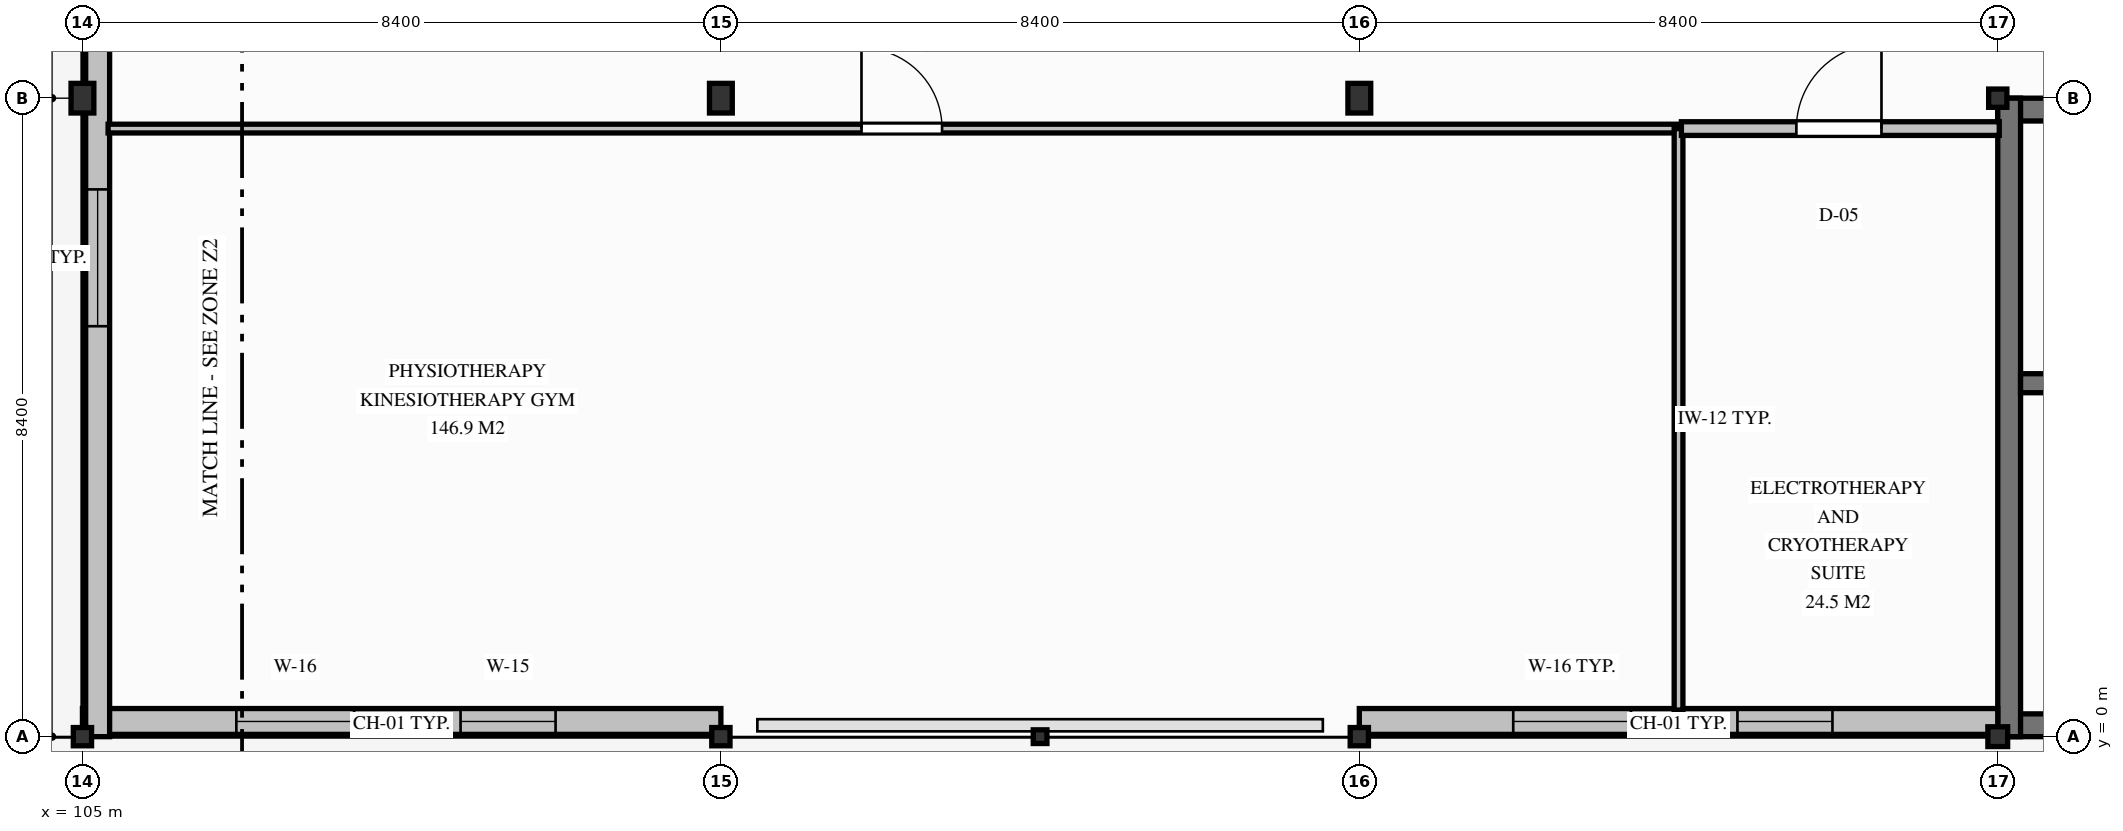
"""IFC4 building model, lengths in metres.
Left out: names, types, materials, properties, quantities, classifications, styles, units other than length and angle.
Written with IfcOpenShell. Run it as: python <this file> out.ifc"""

import sys

from ifc_helpers import new_model, si_unit, direction, frame, frame_2d, origin, origin_2d, place, context, subcontext, project, spatial, rectangle, hollow_rectangle, i_section, extrude, element, fill, save


model = new_model("IFC4")
c1 = context("Model", 3, precision=1e-05, world=origin(), true_north=direction((0.0, 1.0)))
c2 = subcontext(c1, "Body", "Model", "MODEL_VIEW")
j1 = project(units=[si_unit("LENGTHUNIT", "METRE"), si_unit("PLANEANGLEUNIT", "RADIAN")], contexts=[c1])
p1 = place(None, origin())
s1 = spatial("IfcSite", under=j1, at=p1, CompositionType="ELEMENT")
p2 = place(p1, origin())
s2 = spatial("IfcBuilding", under=s1, at=p2, CompositionType="ELEMENT")
p3 = place(p2, origin())
s3 = spatial("IfcBuildingStorey", under=s2, at=p3, CompositionType="ELEMENT", Elevation=0.0)
p4 = place(p3, frame((130.2, 8.25, 0.0), z_axis=(0.0, 0.0, 1.0), x_axis=(1.0, 0.0, 0.0)))
e1 = element("IfcWall", 1, at=p4, inside=s3, PredefinedType="SHEAR", context=c2, shape_type="SweptSolid", body=[
    extrude(rectangle(XDim=8.4, YDim=0.3, at=frame_2d((4.2, 0.0))), origin(), (0.0, 0.0, 1.0), 4.5),
])
p5 = place(p4, frame((0.8, 0.0, 0.0)))
e2 = element("IfcOpeningElement", 2, at=p5, cuts=e1, PredefinedType="OPENING", context=c2, shape_type="SweptSolid", body=[
    extrude(rectangle(XDim=1.1, YDim=2.15, at=frame_2d((0.55, 1.075))), frame((0.0, 0.16, 0.0), z_axis=(0.0, -1.0, 0.0), x_axis=(1.0, 0.0, 0.0)), (0.0, 0.0, 1.0), 0.32),
])
p6 = place(p3, frame((138.6, 0.15, 0.0), z_axis=(0.0, 0.0, 1.0), x_axis=(-1.0, 0.0, 0.0)))
e3 = element("IfcWall", 3, at=p6, inside=s3, PredefinedType="SHEAR", context=c2, shape_type="SweptSolid", body=[
    extrude(rectangle(XDim=8.4, YDim=0.3, at=frame_2d((4.2, 0.0))), origin(), (0.0, 0.0, 1.0), 4.5),
])
p7 = place(p6, frame((6.4, 0.0, 0.0)))
e4 = element("IfcOpeningElement", 4, at=p7, cuts=e3, PredefinedType="OPENING", context=c2, shape_type="SweptSolid", body=[
    extrude(rectangle(XDim=1.3, YDim=2.25, at=frame_2d((0.65, 1.125))), frame((0.0, 0.16, 0.0), z_axis=(0.0, -1.0, 0.0), x_axis=(1.0, 0.0, 0.0)), (0.0, 0.0, 1.0), 0.32),
])
p8 = place(p3, frame((130.35, 0.0, 0.0), z_axis=(0.0, 0.0, 1.0), x_axis=(0.0, 1.0, 0.0)))
e5 = element("IfcWall", 5, at=p8, inside=s3, PredefinedType="SHEAR", context=c2, shape_type="SweptSolid", body=[
    extrude(rectangle(XDim=8.4, YDim=0.3, at=frame_2d((4.2, 0.0))), origin(), (0.0, 0.0, 1.0), 4.5),
])
p9 = place(p3, frame((130.5, 4.65, 0.0), z_axis=(0.0, 0.0, 1.0), x_axis=(1.0, 0.0, 0.0)))
e6 = element("IfcWall", 6, at=p9, inside=s3, PredefinedType="SHEAR", context=c2, shape_type="SweptSolid", body=[
    extrude(rectangle(XDim=7.8, YDim=0.25, at=frame_2d((3.9, 0.0))), origin(), (0.0, 0.0, 1.0), 4.5),
])
p10 = place(p3, frame((105.0, 0.0, 0.0), z_axis=(0.0, 0.0, 1.0), x_axis=(1.0, 0.0, 0.0)))
e7 = element("IfcColumn", 7, at=p10, inside=s3, PredefinedType="COLUMN", context=c2, shape_type="SweptSolid", body=[
    extrude(i_section(OverallWidth=0.24, OverallDepth=0.24, WebThickness=0.01, FlangeThickness=0.017, FilletRadius=0.021, at=origin_2d()), origin(), (0.0, 0.0, 1.0), 4.5),
])
p11 = place(p3, frame((105.0, 8.4, 0.0), z_axis=(0.0, 0.0, 1.0), x_axis=(1.0, 0.0, 0.0)))
e8 = element("IfcColumn", 8, at=p11, inside=s3, PredefinedType="COLUMN", context=c2, shape_type="SweptSolid", body=[
    extrude(i_section(OverallWidth=0.3, OverallDepth=0.39, WebThickness=0.011, FlangeThickness=0.019, FilletRadius=0.027, at=origin_2d()), origin(), (0.0, 0.0, 1.0), 4.5),
])
p12 = place(p3, frame((113.4, 0.0, 0.0), z_axis=(0.0, 0.0, 1.0), x_axis=(1.0, 0.0, 0.0)))
e9 = element("IfcColumn", 9, at=p12, inside=s3, PredefinedType="COLUMN", context=c2, shape_type="SweptSolid", body=[
    extrude(i_section(OverallWidth=0.24, OverallDepth=0.24, WebThickness=0.01, FlangeThickness=0.017, FilletRadius=0.021, at=origin_2d()), origin(), (0.0, 0.0, 1.0), 4.5),
])
p13 = place(p3, frame((113.4, 8.4, 0.0), z_axis=(0.0, 0.0, 1.0), x_axis=(1.0, 0.0, 0.0)))
e10 = element("IfcColumn", 10, at=p13, inside=s3, PredefinedType="COLUMN", context=c2, shape_type="SweptSolid", body=[
    extrude(i_section(OverallWidth=0.3, OverallDepth=0.39, WebThickness=0.011, FlangeThickness=0.019, FilletRadius=0.027, at=origin_2d()), origin(), (0.0, 0.0, 1.0), 4.5),
])
p14 = place(p3, frame((121.8, 0.0, 0.0), z_axis=(0.0, 0.0, 1.0), x_axis=(1.0, 0.0, 0.0)))
e11 = element("IfcColumn", 11, at=p14, inside=s3, PredefinedType="COLUMN", context=c2, shape_type="SweptSolid", body=[
    extrude(i_section(OverallWidth=0.24, OverallDepth=0.24, WebThickness=0.01, FlangeThickness=0.017, FilletRadius=0.021, at=origin_2d()), origin(), (0.0, 0.0, 1.0), 4.5),
])
p15 = place(p3, frame((121.8, 8.4, 0.0), z_axis=(0.0, 0.0, 1.0), x_axis=(1.0, 0.0, 0.0)))
e12 = element("IfcColumn", 12, at=p15, inside=s3, PredefinedType="COLUMN", context=c2, shape_type="SweptSolid", body=[
    extrude(i_section(OverallWidth=0.3, OverallDepth=0.39, WebThickness=0.011, FlangeThickness=0.019, FilletRadius=0.027, at=origin_2d()), origin(), (0.0, 0.0, 1.0), 4.5),
])
p16 = place(p3, frame((130.2, 0.0, 0.0), z_axis=(0.0, 0.0, 1.0), x_axis=(1.0, 0.0, 0.0)))
e13 = element("IfcColumn", 13, at=p16, inside=s3, PredefinedType="COLUMN", context=c2, shape_type="SweptSolid", body=[
    extrude(i_section(OverallWidth=0.26, OverallDepth=0.26, WebThickness=0.01, FlangeThickness=0.018, FilletRadius=0.024, at=origin_2d()), origin(), (0.0, 0.0, 1.0), 4.5),
])
p17 = place(p3, frame((130.2, 8.4, 0.0), z_axis=(0.0, 0.0, 1.0), x_axis=(1.0, 0.0, 0.0)))
e14 = element("IfcColumn", 14, at=p17, inside=s3, PredefinedType="COLUMN", context=c2, shape_type="SweptSolid", body=[
    extrude(i_section(OverallWidth=0.24, OverallDepth=0.24, WebThickness=0.01, FlangeThickness=0.017, FilletRadius=0.021, at=origin_2d()), origin(), (0.0, 0.0, 1.0), 4.5),
])
p18 = place(p3, frame((117.6, 0.0, 0.0), z_axis=(0.0, 0.0, 1.0), x_axis=(1.0, 0.0, 0.0)))
e15 = element("IfcColumn", 15, at=p18, inside=s3, PredefinedType="PILASTER", context=c2, shape_type="SweptSolid", body=[
    extrude(hollow_rectangle(XDim=0.18, YDim=0.18, WallThickness=0.01, InnerFilletRadius=0.015, OuterFilletRadius=0.025, at=origin_2d()), origin(), (0.0, 0.0, 1.0), 4.5),
])
p19 = place(p3, frame((130.2, 0.2, 0.0), z_axis=(0.0, 0.0, 1.0), x_axis=(-1.0, 0.0, 0.0)))
e16 = element("IfcWall", 16, at=p19, inside=s3, PredefinedType="SOLIDWALL", context=c2, shape_type="SweptSolid", body=[
    extrude(rectangle(XDim=8.4, YDim=0.34, at=frame_2d((4.2, 0.0))), origin(), (0.0, 0.0, 1.0), 3.678),
])
p20 = place(p19, frame((2.175, 0.0, 0.85)))
e17 = element("IfcOpeningElement", 17, at=p20, cuts=e16, PredefinedType="OPENING", context=c2, shape_type="SweptSolid", body=[
    extrude(rectangle(XDim=1.25, YDim=1.5, at=frame_2d((0.625, 0.75))), frame((0.0, 0.18, 0.0), z_axis=(0.0, -1.0, 0.0), x_axis=(1.0, 0.0, 0.0)), (0.0, 0.0, 1.0), 0.36),
])
p21 = place(p19, frame((4.825, 0.0, 0.85)))
e18 = element("IfcOpeningElement", 18, at=p21, cuts=e16, PredefinedType="OPENING", context=c2, shape_type="SweptSolid", body=[
    extrude(rectangle(XDim=1.55, YDim=1.6, at=frame_2d((0.775, 0.8))), frame((0.0, 0.18, 0.0), z_axis=(0.0, -1.0, 0.0), x_axis=(1.0, 0.0, 0.0)), (0.0, 0.0, 1.0), 0.36),
])
p22 = place(p3, frame((113.4, 0.2, 0.0), z_axis=(0.0, 0.0, 1.0), x_axis=(-1.0, 0.0, 0.0)))
e19 = element("IfcWall", 19, at=p22, inside=s3, PredefinedType="SOLIDWALL", context=c2, shape_type="SweptSolid", body=[
    extrude(rectangle(XDim=8.4, YDim=0.34, at=frame_2d((4.2, 0.0))), origin(), (0.0, 0.0, 1.0), 3.778),
])
p23 = place(p22, frame((2.175, 0.0, 0.85)))
e20 = element("IfcOpeningElement", 20, at=p23, cuts=e19, PredefinedType="OPENING", context=c2, shape_type="SweptSolid", body=[
    extrude(rectangle(XDim=1.25, YDim=1.5, at=frame_2d((0.625, 0.75))), frame((0.0, 0.18, 0.0), z_axis=(0.0, -1.0, 0.0), x_axis=(1.0, 0.0, 0.0)), (0.0, 0.0, 1.0), 0.36),
])
p24 = place(p22, frame((4.825, 0.0, 0.85)))
e21 = element("IfcOpeningElement", 21, at=p24, cuts=e19, PredefinedType="OPENING", context=c2, shape_type="SweptSolid", body=[
    extrude(rectangle(XDim=1.55, YDim=1.6, at=frame_2d((0.775, 0.8))), frame((0.0, 0.18, 0.0), z_axis=(0.0, -1.0, 0.0), x_axis=(1.0, 0.0, 0.0)), (0.0, 0.0, 1.0), 0.36),
])
p25 = place(p3, frame((105.2, 0.0, 0.0), z_axis=(0.0, 0.0, 1.0), x_axis=(0.0, 1.0, 0.0)))
e22 = element("IfcWall", 22, at=p25, inside=s3, PredefinedType="SOLIDWALL", context=c2, shape_type="SweptSolid", body=[
    extrude(rectangle(XDim=25.2, YDim=0.315, at=frame_2d((12.6, 0.0))), origin(), (0.0, 0.0, 1.0), 3.778),
])
p26 = place(p25, frame((5.4, 0.0, 0.85)))
e23 = element("IfcOpeningElement", 23, at=p26, cuts=e22, PredefinedType="OPENING", context=c2, shape_type="SweptSolid", body=[
    extrude(rectangle(XDim=1.8, YDim=1.95, at=frame_2d((0.9, 0.975))), frame((0.0, 0.167, 0.0), z_axis=(0.0, -1.0, 0.0), x_axis=(1.0, 0.0, 0.0)), (0.0, 0.0, 1.0), 0.335),
])
p27 = place(p25, frame((11.6, 0.0, 0.85)))
e24 = element("IfcOpeningElement", 24, at=p27, cuts=e22, PredefinedType="OPENING", context=c2, shape_type="SweptSolid", body=[
    extrude(rectangle(XDim=2.0, YDim=1.95, at=frame_2d((1.0, 0.975))), frame((0.0, 0.167, 0.0), z_axis=(0.0, -1.0, 0.0), x_axis=(1.0, 0.0, 0.0)), (0.0, 0.0, 1.0), 0.335),
])
p28 = place(p25, frame((17.85, 0.0, 0.85)))
e25 = element("IfcOpeningElement", 25, at=p28, cuts=e22, PredefinedType="OPENING", context=c2, shape_type="SweptSolid", body=[
    extrude(rectangle(XDim=2.1, YDim=2.0, at=frame_2d((1.05, 1.0))), frame((0.0, 0.167, 0.0), z_axis=(0.0, -1.0, 0.0), x_axis=(1.0, 0.0, 0.0)), (0.0, 0.0, 1.0), 0.335),
])
p29 = place(p3, frame((105.337, 8.0, 0.0), z_axis=(0.0, 0.0, 1.0), x_axis=(1.0, 0.0, 0.0)))
e26 = element("IfcWall", 26, at=p29, inside=s3, PredefinedType="PARTITIONING", context=c2, shape_type="SweptSolid", body=[
    extrude(rectangle(XDim=20.663, YDim=0.115, at=frame_2d((10.331, 0.0))), origin(), (0.0, 0.0, 1.0), 3.778),
])
p30 = place(p29, frame((9.913, 0.0, 0.0)))
e27 = element("IfcOpeningElement", 27, at=p30, cuts=e26, PredefinedType="OPENING", context=c2, shape_type="SweptSolid", body=[
    extrude(rectangle(XDim=1.06, YDim=2.16, at=frame_2d((0.53, 1.08))), frame((0.0, 0.067, 0.0), z_axis=(0.0, -1.0, 0.0), x_axis=(1.0, 0.0, 0.0)), (0.0, 0.0, 1.0), 0.135),
])
p31 = place(p3, frame((126.0, 8.0, 0.0), z_axis=(0.0, 0.0, 1.0), x_axis=(0.0, -1.0, 0.0)))
e28 = element("IfcWall", 28, at=p31, inside=s3, PredefinedType="PARTITIONING", context=c2, shape_type="SweptSolid", body=[
    extrude(rectangle(XDim=7.65, YDim=0.115, at=frame_2d((3.825, 0.0))), origin(), (0.0, 0.0, 1.0), 3.928),
])
p32 = place(p3, frame((126.038, 8.0, 0.0), z_axis=(0.0, 0.0, 1.0), x_axis=(1.0, 0.0, 0.0)))
e29 = element("IfcWall", 29, at=p32, inside=s3, PredefinedType="PARTITIONING", context=c2, shape_type="SweptSolid", body=[
    extrude(rectangle(XDim=4.182, YDim=0.18, at=frame_2d((2.091, 0.0))), origin(), (0.0, 0.0, 1.0), 3.678),
])
p33 = place(p32, frame((1.512, 0.0, 0.0)))
e30 = element("IfcOpeningElement", 30, at=p33, cuts=e29, PredefinedType="OPENING", context=c2, shape_type="SweptSolid", body=[
    extrude(rectangle(XDim=1.12, YDim=2.18, at=frame_2d((0.56, 1.09))), frame((0.0, 0.1, 0.0), z_axis=(0.0, -1.0, 0.0), x_axis=(1.0, 0.0, 0.0)), (0.0, 0.0, 1.0), 0.2),
])
p34 = place(p20, origin())
e31 = element("IfcWindow", 31, at=p34, inside=s3, PartitioningType="SINGLE_PANEL", PredefinedType="WINDOW", context=c2, shape_type="SweptSolid", body=[
    extrude(rectangle(XDim=1.25, YDim=1.5, at=frame_2d((0.625, 0.75))), frame((0.0, 0.03, 0.0), z_axis=(0.0, -1.0, 0.0), x_axis=(1.0, 0.0, 0.0)), (0.0, 0.0, 1.0), 0.06),
])
fill(e17, e31)
p35 = place(p21, origin())
e32 = element("IfcWindow", 32, at=p35, inside=s3, PartitioningType="SINGLE_PANEL", PredefinedType="WINDOW", context=c2, shape_type="SweptSolid", body=[
    extrude(rectangle(XDim=1.55, YDim=1.6, at=frame_2d((0.775, 0.8))), frame((0.0, 0.03, 0.0), z_axis=(0.0, -1.0, 0.0), x_axis=(1.0, 0.0, 0.0)), (0.0, 0.0, 1.0), 0.06),
])
fill(e18, e32)
p36 = place(p23, origin())
e33 = element("IfcWindow", 33, at=p36, inside=s3, PartitioningType="SINGLE_PANEL", PredefinedType="WINDOW", context=c2, shape_type="SweptSolid", body=[
    extrude(rectangle(XDim=1.25, YDim=1.5, at=frame_2d((0.625, 0.75))), frame((0.0, 0.03, 0.0), z_axis=(0.0, -1.0, 0.0), x_axis=(1.0, 0.0, 0.0)), (0.0, 0.0, 1.0), 0.06),
])
fill(e20, e33)
p37 = place(p24, origin())
e34 = element("IfcWindow", 34, at=p37, inside=s3, PartitioningType="SINGLE_PANEL", PredefinedType="WINDOW", context=c2, shape_type="SweptSolid", body=[
    extrude(rectangle(XDim=1.55, YDim=1.6, at=frame_2d((0.775, 0.8))), frame((0.0, 0.03, 0.0), z_axis=(0.0, -1.0, 0.0), x_axis=(1.0, 0.0, 0.0)), (0.0, 0.0, 1.0), 0.06),
])
fill(e21, e34)
p38 = place(p26, origin())
e35 = element("IfcWindow", 35, at=p38, inside=s3, PartitioningType="SINGLE_PANEL", PredefinedType="WINDOW", context=c2, shape_type="SweptSolid", body=[
    extrude(rectangle(XDim=1.8, YDim=1.95, at=frame_2d((0.9, 0.975))), frame((0.0, 0.03, 0.0), z_axis=(0.0, -1.0, 0.0), x_axis=(1.0, 0.0, 0.0)), (0.0, 0.0, 1.0), 0.06),
])
fill(e23, e35)
p39 = place(p30, origin())
e36 = element("IfcDoor", 36, at=p39, inside=s3, OperationType="SINGLE_SWING_LEFT", PredefinedType="DOOR", context=c2, shape_type="SweptSolid", body=[
    extrude(rectangle(XDim=1.06, YDim=2.16, at=frame_2d((0.53, 1.08))), frame((0.0, 0.025, 0.0), z_axis=(0.0, -1.0, 0.0), x_axis=(1.0, 0.0, 0.0)), (0.0, 0.0, 1.0), 0.05),
])
fill(e27, e36)
p40 = place(p33, origin())
e37 = element("IfcDoor", 37, at=p40, inside=s3, OperationType="SINGLE_SWING_RIGHT", PredefinedType="DOOR", context=c2, shape_type="SweptSolid", body=[
    extrude(rectangle(XDim=1.12, YDim=2.18, at=frame_2d((0.56, 1.09))), frame((0.0, 0.025, 0.0), z_axis=(0.0, -1.0, 0.0), x_axis=(1.0, 0.0, 0.0)), (0.0, 0.0, 1.0), 0.05),
])
fill(e30, e37)
save(model, sys.argv[1])
